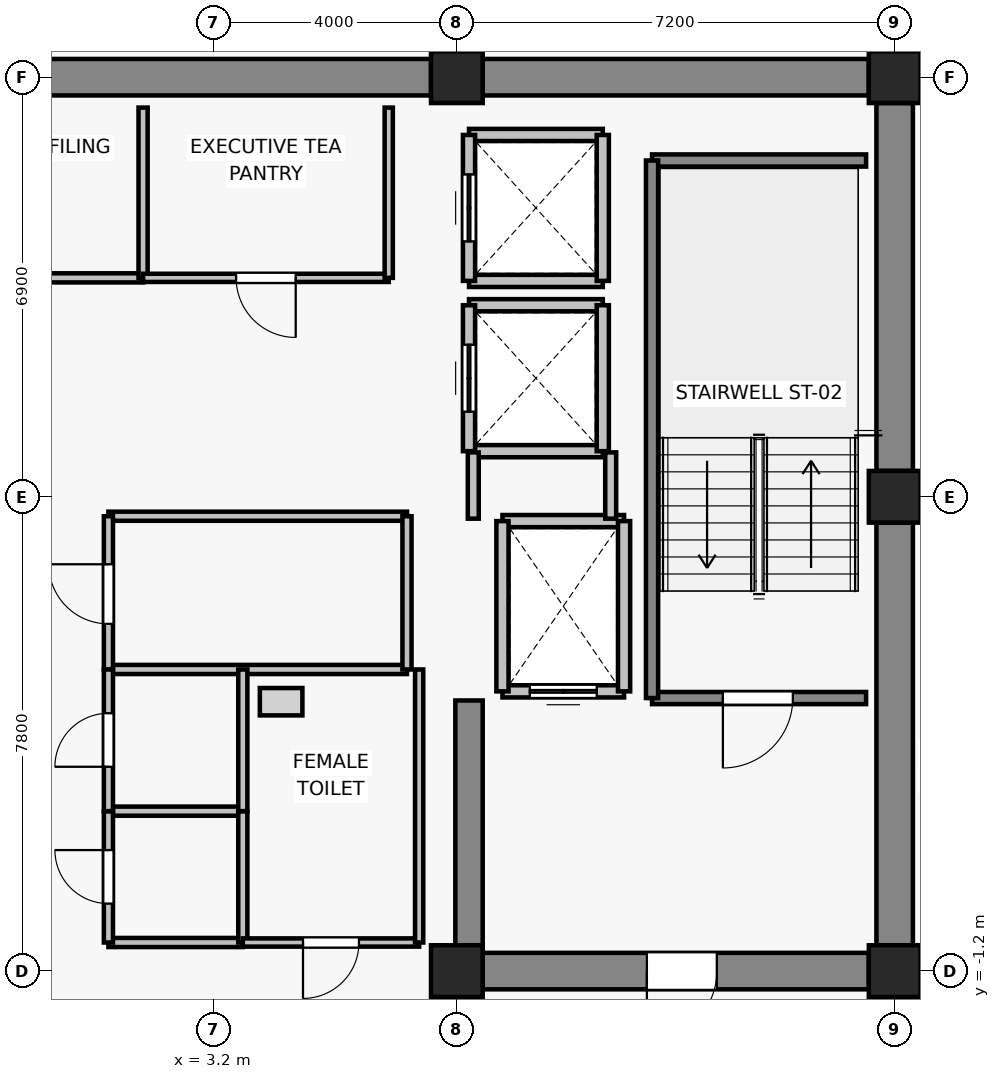
"""IFC4 building model, lengths in metres.
Left out: names, types, materials, properties, quantities, classifications, styles, units other than length and angle.
Written with IfcOpenShell. Run it as: python <this file> out.ifc"""

import sys

from ifc_helpers import new_model, si_unit, direction, frame, frame_2d, origin, origin_2d, place, context, subcontext, project, spatial, rectangle, extrude, source, transform, mapped, element, fill, save


model = new_model("IFC4")
c1 = context("Model", 3, precision=1e-05, world=origin(), true_north=direction((0.0, 1.0)))
c2 = subcontext(c1, "Body", "Model", "MODEL_VIEW")
j1 = project(units=[si_unit("LENGTHUNIT", "METRE"), si_unit("PLANEANGLEUNIT", "RADIAN")], contexts=[c1])
p1 = place(None, origin())
s1 = spatial("IfcSite", under=j1, at=p1, CompositionType="ELEMENT")
p2 = place(p1, origin())
s2 = spatial("IfcBuilding", under=s1, at=p2, CompositionType="ELEMENT")
p3 = place(p2, frame((0.0, 0.0, 241.9)))
s3 = spatial("IfcBuildingStorey", under=s2, at=p3, CompositionType="ELEMENT", Elevation=241.9)
for number, where, z_axis, x_axis in (
    (1, (7.2, -1.2, 0.0), (0.0, 0.0, 1.0), (1.0, 0.0, 0.0)),
    (2, (14.4, -1.2, 0.0), (0.0, 0.0, 1.0), (1.0, 0.0, 0.0)),
    (3, (14.4, 6.6, 0.0), (0.0, 0.0, 1.0), (1.0, 0.0, 0.0)),
    (4, (7.2, 13.5, 0.0), (0.0, 0.0, 1.0), (1.0, 0.0, 0.0)),
    (5, (14.4, 13.5, 0.0), (0.0, 0.0, 1.0), (1.0, 0.0, 0.0)),
):
    element("IfcColumn", number, at=place(p3, frame(where, z_axis=z_axis, x_axis=x_axis)), inside=s3, PredefinedType="COLUMN", context=c2, shape_type="SweptSolid", body=[
        extrude(rectangle(XDim=0.85, YDim=0.85, at=origin_2d()), origin(), (0.0, 0.0, 1.0), 3.3),
    ])
p4 = place(p3, frame((-6.775, 13.5, 0.0), z_axis=(0.0, 0.0, 1.0), x_axis=(1.0, 0.0, 0.0)))
e6 = element("IfcWall", 6, at=p4, inside=s3, PredefinedType="SHEAR", context=c2, shape_type="SweptSolid", body=[
    extrude(rectangle(XDim=13.55, YDim=0.6, at=frame_2d((6.775, 0.0))), origin(), (0.0, 0.0, 1.0), 3.075),
])
p5 = place(p3, frame((7.625, 13.5, 0.0), z_axis=(0.0, 0.0, 1.0), x_axis=(1.0, 0.0, 0.0)))
e7 = element("IfcWall", 7, at=p5, inside=s3, PredefinedType="SHEAR", context=c2, shape_type="SweptSolid", body=[
    extrude(rectangle(XDim=6.35, YDim=0.6, at=frame_2d((3.175, 0.0))), origin(), (0.0, 0.0, 1.0), 3.075),
])
p6 = place(p3, frame((14.4, -0.775, 0.0), z_axis=(0.0, 0.0, 1.0), x_axis=(0.0, 1.0, 0.0)))
e8 = element("IfcWall", 8, at=p6, inside=s3, PredefinedType="SHEAR", context=c2, shape_type="SweptSolid", body=[
    extrude(rectangle(XDim=6.95, YDim=0.6, at=frame_2d((3.475, 0.0))), origin(), (0.0, 0.0, 1.0), 3.075),
])
p7 = place(p3, frame((14.4, 7.025, 0.0), z_axis=(0.0, 0.0, 1.0), x_axis=(0.0, 1.0, 0.0)))
e9 = element("IfcWall", 9, at=p7, inside=s3, PredefinedType="SHEAR", context=c2, shape_type="SweptSolid", body=[
    extrude(rectangle(XDim=6.05, YDim=0.6, at=frame_2d((3.025, 0.0))), origin(), (0.0, 0.0, 1.0), 3.075),
])
p8 = place(p3, frame((13.975, -1.2, 0.0), z_axis=(0.0, 0.0, 1.0), x_axis=(-1.0, 0.0, 0.0)))
e10 = element("IfcWall", 10, at=p8, inside=s3, PredefinedType="SHEAR", context=c2, shape_type="SweptSolid", body=[
    extrude(rectangle(XDim=6.35, YDim=0.6, at=frame_2d((3.175, 0.0))), origin(), (0.0, 0.0, 1.0), 3.075),
])
p9 = place(p8, frame((2.5, 0.0, 0.0)))
e11 = element("IfcOpeningElement", 11, at=p9, cuts=e10, PredefinedType="OPENING", context=c2, shape_type="SweptSolid", body=[
    extrude(rectangle(XDim=1.15, YDim=2.15, at=frame_2d((0.575, 1.075))), frame((0.0, 0.31, 0.0), z_axis=(0.0, -1.0, 0.0), x_axis=(1.0, 0.0, 0.0)), (0.0, 0.0, 1.0), 0.62),
])
p10 = place(p3, frame((7.4, -0.9, 0.0), z_axis=(0.0, 0.0, 1.0), x_axis=(0.0, 1.0, 0.0)))
e12 = element("IfcWall", 12, at=p10, inside=s3, PredefinedType="SHEAR", context=c2, shape_type="SweptSolid", body=[
    extrude(rectangle(XDim=4.15, YDim=0.45, at=frame_2d((2.075, 0.0))), origin(), (0.0, 0.0, 1.0), 3.075),
])
p11 = place(p3, frame((9.95, 3.4, 0.0), z_axis=(0.0, 0.0, 1.0), x_axis=(-1.0, 0.0, 0.0)))
e13 = element("IfcWall", 13, at=p11, inside=s3, PredefinedType="SOLIDWALL", context=c2, shape_type="SweptSolid", body=[
    extrude(rectangle(XDim=2.0, YDim=0.2, at=frame_2d((1.0, 0.0))), origin(), (0.0, 0.0, 1.0), 3.075),
])
p12 = place(p11, frame((0.45, 0.0, 0.0)))
e14 = element("IfcOpeningElement", 14, at=p12, cuts=e13, PredefinedType="OPENING", context=c2, shape_type="SweptSolid", body=[
    extrude(rectangle(XDim=1.1, YDim=2.2, at=frame_2d((0.55, 1.1))), frame((0.0, 0.11, 0.0), z_axis=(0.0, -1.0, 0.0), x_axis=(1.0, 0.0, 0.0)), (0.0, 0.0, 1.0), 0.22),
])
p13 = place(p3, frame((7.95, 6.2, 0.0), z_axis=(0.0, 0.0, 1.0), x_axis=(1.0, 0.0, 0.0)))
e15 = element("IfcWall", 15, at=p13, inside=s3, PredefinedType="SOLIDWALL", context=c2, shape_type="SweptSolid", body=[
    extrude(rectangle(XDim=2.0, YDim=0.2, at=frame_2d((1.0, 0.0))), origin(), (0.0, 0.0, 1.0), 3.075),
])
for number, where, z_axis, x_axis in (
    (16, (7.95, 3.4, 0.0), (0.0, 0.0, 1.0), (0.0, 1.0, 0.0)),
    (17, (9.95, 6.2, 0.0), (0.0, 0.0, 1.0), (0.0, -1.0, 0.0)),
):
    element("IfcWall", number, at=place(p3, frame(where, z_axis=z_axis, x_axis=x_axis)), inside=s3, PredefinedType="SOLIDWALL", context=c2, shape_type="SweptSolid", body=[
        extrude(rectangle(XDim=2.8, YDim=0.2, at=frame_2d((1.4, 0.0))), origin(), (0.0, 0.0, 1.0), 3.075),
    ])
for number, where, z_axis, x_axis in (
    (18, (9.6, 7.35, 0.0), (0.0, 0.0, 1.0), (-1.0, 0.0, 0.0)),
    (19, (7.4, 9.75, 0.0), (0.0, 0.0, 1.0), (1.0, 0.0, 0.0)),
):
    element("IfcWall", number, at=place(p3, frame(where, z_axis=z_axis, x_axis=x_axis)), inside=s3, PredefinedType="SOLIDWALL", context=c2, shape_type="SweptSolid", body=[
        extrude(rectangle(XDim=2.2, YDim=0.2, at=frame_2d((1.1, 0.0))), origin(), (0.0, 0.0, 1.0), 2.615),
    ])
p14 = place(p3, frame((7.4, 7.35, 0.0), z_axis=(0.0, 0.0, 1.0), x_axis=(0.0, 1.0, 0.0)))
e20 = element("IfcWall", 20, at=p14, inside=s3, PredefinedType="SOLIDWALL", context=c2, shape_type="SweptSolid", body=[
    extrude(rectangle(XDim=2.4, YDim=0.2, at=frame_2d((1.2, 0.0))), origin(), (0.0, 0.0, 1.0), 2.615),
])
p15 = place(p14, frame((0.65, 0.0, 0.0)))
e21 = element("IfcOpeningElement", 21, at=p15, cuts=e20, PredefinedType="OPENING", context=c2, shape_type="SweptSolid", body=[
    extrude(rectangle(XDim=1.1, YDim=2.2, at=frame_2d((0.55, 1.1))), frame((0.0, 0.11, 0.0), z_axis=(0.0, -1.0, 0.0), x_axis=(1.0, 0.0, 0.0)), (0.0, 0.0, 1.0), 0.22),
])
p16 = place(p3, frame((9.6, 9.75, 0.0), z_axis=(0.0, 0.0, 1.0), x_axis=(0.0, -1.0, 0.0)))
e22 = element("IfcWall", 22, at=p16, inside=s3, PredefinedType="SOLIDWALL", context=c2, shape_type="SweptSolid", body=[
    extrude(rectangle(XDim=2.4, YDim=0.2, at=frame_2d((1.2, 0.0))), origin(), (0.0, 0.0, 1.0), 3.075),
])
for number, where, z_axis, x_axis in (
    (23, (9.6, 10.15, 0.0), (0.0, 0.0, 1.0), (-1.0, 0.0, 0.0)),
    (24, (7.4, 12.55, 0.0), (0.0, 0.0, 1.0), (1.0, 0.0, 0.0)),
):
    element("IfcWall", number, at=place(p3, frame(where, z_axis=z_axis, x_axis=x_axis)), inside=s3, PredefinedType="SOLIDWALL", context=c2, shape_type="SweptSolid", body=[
        extrude(rectangle(XDim=2.2, YDim=0.2, at=frame_2d((1.1, 0.0))), origin(), (0.0, 0.0, 1.0), 2.615),
    ])
p17 = place(p3, frame((7.4, 10.15, 0.0), z_axis=(0.0, 0.0, 1.0), x_axis=(0.0, 1.0, 0.0)))
e25 = element("IfcWall", 25, at=p17, inside=s3, PredefinedType="SOLIDWALL", context=c2, shape_type="SweptSolid", body=[
    extrude(rectangle(XDim=2.4, YDim=0.2, at=frame_2d((1.2, 0.0))), origin(), (0.0, 0.0, 1.0), 2.615),
])
p18 = place(p17, frame((0.65, 0.0, 0.0)))
e26 = element("IfcOpeningElement", 26, at=p18, cuts=e25, PredefinedType="OPENING", context=c2, shape_type="SweptSolid", body=[
    extrude(rectangle(XDim=1.1, YDim=2.2, at=frame_2d((0.55, 1.1))), frame((0.0, 0.11, 0.0), z_axis=(0.0, -1.0, 0.0), x_axis=(1.0, 0.0, 0.0)), (0.0, 0.0, 1.0), 0.22),
])
p19 = place(p3, frame((9.6, 12.55, 0.0), z_axis=(0.0, 0.0, 1.0), x_axis=(0.0, -1.0, 0.0)))
e27 = element("IfcWall", 27, at=p19, inside=s3, PredefinedType="SOLIDWALL", context=c2, shape_type="SweptSolid", body=[
    extrude(rectangle(XDim=2.4, YDim=0.2, at=frame_2d((1.2, 0.0))), origin(), (0.0, 0.0, 1.0), 3.075),
])
p20 = place(p3, frame((13.93, 3.29, 0.0), z_axis=(0.0, 0.0, 1.0), x_axis=(-1.0, 0.0, 0.0)))
e28 = element("IfcWall", 28, at=p20, inside=s3, PredefinedType="SOLIDWALL", context=c2, shape_type="SweptSolid", body=[
    extrude(rectangle(XDim=3.52, YDim=0.2, at=frame_2d((1.76, 0.0))), origin(), (0.0, 0.0, 1.0), 3.075),
])
p21 = place(p20, frame((1.205, 0.0, 0.0)))
e29 = element("IfcOpeningElement", 29, at=p21, cuts=e28, PredefinedType="OPENING", context=c2, shape_type="SweptSolid", body=[
    extrude(rectangle(XDim=1.15, YDim=2.15, at=frame_2d((0.575, 1.075))), frame((0.0, 0.11, 0.0), z_axis=(0.0, -1.0, 0.0), x_axis=(1.0, 0.0, 0.0)), (0.0, 0.0, 1.0), 0.22),
])
p22 = place(p3, frame((10.41, 12.13, 0.0), z_axis=(0.0, 0.0, 1.0), x_axis=(1.0, 0.0, 0.0)))
e30 = element("IfcWall", 30, at=p22, inside=s3, PredefinedType="SOLIDWALL", context=c2, shape_type="SweptSolid", body=[
    extrude(rectangle(XDim=3.52, YDim=0.2, at=frame_2d((1.76, 0.0))), origin(), (0.0, 0.0, 1.0), 3.075),
])
p23 = place(p3, frame((10.41, 3.29, 0.0), z_axis=(0.0, 0.0, 1.0), x_axis=(0.0, 1.0, 0.0)))
e31 = element("IfcWall", 31, at=p23, inside=s3, PredefinedType="SOLIDWALL", context=c2, shape_type="SweptSolid", body=[
    extrude(rectangle(XDim=8.84, YDim=0.2, at=frame_2d((4.42, 0.0))), origin(), (0.0, 0.0, 1.0), 3.075),
])
p24 = place(p3, frame((7.47, 6.24, 0.0), z_axis=(0.0, 0.0, 1.0), x_axis=(0.0, 1.0, 0.0)))
e32 = element("IfcWall", 32, at=p24, inside=s3, PredefinedType="PARTITIONING", context=c2, shape_type="SweptSolid", body=[
    extrude(rectangle(XDim=1.09, YDim=0.18, at=frame_2d((0.545, 0.0))), origin(), (0.0, 0.0, 1.0), 2.615),
])
p25 = place(p3, frame((9.73, 7.33, 0.0), z_axis=(0.0, 0.0, 1.0), x_axis=(0.0, -1.0, 0.0)))
e33 = element("IfcWall", 33, at=p25, inside=s3, PredefinedType="PARTITIONING", context=c2, shape_type="SweptSolid", body=[
    extrude(rectangle(XDim=1.09, YDim=0.18, at=frame_2d((0.545, 0.0))), origin(), (0.0, 0.0, 1.0), 3.075),
])
p26 = place(p3, frame((2.04, 10.2, 0.0), z_axis=(0.0, 0.0, 1.0), x_axis=(-1.0, 0.0, 0.0)))
e34 = element("IfcWall", 34, at=p26, inside=s3, PredefinedType="PARTITIONING", context=c2, shape_type="SweptSolid", body=[
    extrude(rectangle(XDim=4.16, YDim=0.15, at=frame_2d((2.08, 0.0))), origin(), (0.0, 0.0, 1.0), 3.075),
])
p27 = place(p26, frame((1.55, 0.0, 0.0)))
e35 = element("IfcOpeningElement", 35, at=p27, cuts=e34, PredefinedType="OPENING", context=c2, shape_type="SweptSolid", body=[
    extrude(rectangle(XDim=0.98, YDim=2.15, at=frame_2d((0.49, 1.075))), frame((0.0, 0.085, 0.0), z_axis=(0.0, -1.0, 0.0), x_axis=(1.0, 0.0, 0.0)), (0.0, 0.0, 1.0), 0.17),
])
p28 = place(p3, frame((2.04, 13.0, 0.0), z_axis=(0.0, 0.0, 1.0), x_axis=(0.0, -1.0, 0.0)))
e36 = element("IfcWall", 36, at=p28, inside=s3, PredefinedType="PARTITIONING", context=c2, shape_type="SweptSolid", body=[
    extrude(rectangle(XDim=2.8, YDim=0.15, at=frame_2d((1.4, 0.0))), origin(), (0.0, 0.0, 1.0), 3.075),
])
p29 = place(p3, frame((6.08, 10.2, 0.0), z_axis=(0.0, 0.0, 1.0), x_axis=(-1.0, 0.0, 0.0)))
e37 = element("IfcWall", 37, at=p29, inside=s3, PredefinedType="PARTITIONING", context=c2, shape_type="SweptSolid", body=[
    extrude(rectangle(XDim=4.04, YDim=0.135, at=frame_2d((2.02, 0.0))), origin(), (0.0, 0.0, 1.0), 3.075),
])
p30 = place(p29, frame((1.53, 0.0, 0.0)))
e38 = element("IfcOpeningElement", 38, at=p30, cuts=e37, PredefinedType="OPENING", context=c2, shape_type="SweptSolid", body=[
    extrude(rectangle(XDim=0.98, YDim=2.15, at=frame_2d((0.49, 1.075))), frame((0.0, 0.077, 0.0), z_axis=(0.0, -1.0, 0.0), x_axis=(1.0, 0.0, 0.0)), (0.0, 0.0, 1.0), 0.155),
])
p31 = place(p3, frame((6.08, 13.0, 0.0), z_axis=(0.0, 0.0, 1.0), x_axis=(0.0, -1.0, 0.0)))
e39 = element("IfcWall", 39, at=p31, inside=s3, PredefinedType="PARTITIONING", context=c2, shape_type="SweptSolid", body=[
    extrude(rectangle(XDim=2.8, YDim=0.135, at=frame_2d((1.4, 0.0))), origin(), (0.0, 0.0, 1.0), 3.075),
])
for number, where, z_axis, x_axis in (
    (40, (6.38, 3.76, 0.0), (0.0, 0.0, 1.0), (-1.0, 0.0, 0.0)),
    (41, (1.47, 6.28, 0.0), (0.0, 0.0, 1.0), (1.0, 0.0, 0.0)),
):
    element("IfcWall", number, at=place(p3, frame(where, z_axis=z_axis, x_axis=x_axis)), inside=s3, PredefinedType="PARTITIONING", context=c2, shape_type="SweptSolid", body=[
        extrude(rectangle(XDim=4.91, YDim=0.15, at=frame_2d((2.455, 0.0))), origin(), (0.0, 0.0, 1.0), 3.075),
    ])
p32 = place(p3, frame((1.47, 3.76, 0.0), z_axis=(0.0, 0.0, 1.0), x_axis=(0.0, 1.0, 0.0)))
e42 = element("IfcWall", 42, at=p32, inside=s3, PredefinedType="PARTITIONING", context=c2, shape_type="SweptSolid", body=[
    extrude(rectangle(XDim=2.52, YDim=0.15, at=frame_2d((1.26, 0.0))), origin(), (0.0, 0.0, 1.0), 3.075),
])
p33 = place(p32, frame((0.75, 0.0, 0.0)))
e43 = element("IfcOpeningElement", 43, at=p33, cuts=e42, PredefinedType="OPENING", context=c2, shape_type="SweptSolid", body=[
    extrude(rectangle(XDim=0.98, YDim=2.15, at=frame_2d((0.49, 1.075))), frame((0.0, 0.085, 0.0), z_axis=(0.0, -1.0, 0.0), x_axis=(1.0, 0.0, 0.0)), (0.0, 0.0, 1.0), 0.17),
])
p34 = place(p3, frame((6.38, 6.28, 0.0), z_axis=(0.0, 0.0, 1.0), x_axis=(0.0, -1.0, 0.0)))
e44 = element("IfcWall", 44, at=p34, inside=s3, PredefinedType="PARTITIONING", context=c2, shape_type="SweptSolid", body=[
    extrude(rectangle(XDim=2.52, YDim=0.15, at=frame_2d((1.26, 0.0))), origin(), (0.0, 0.0, 1.0), 3.075),
])
for number, where, z_axis, x_axis in (
    (45, (3.68, -0.73, 0.0), (0.0, 0.0, 1.0), (-1.0, 0.0, 0.0)),
    (46, (1.47, 1.43, 0.0), (0.0, 0.0, 1.0), (1.0, 0.0, 0.0)),
):
    element("IfcWall", number, at=place(p3, frame(where, z_axis=z_axis, x_axis=x_axis)), inside=s3, PredefinedType="PARTITIONING", context=c2, shape_type="SweptSolid", body=[
        extrude(rectangle(XDim=2.21, YDim=0.15, at=frame_2d((1.105, 0.0))), origin(), (0.0, 0.0, 1.0), 3.075),
    ])
p35 = place(p3, frame((1.47, -0.73, 0.0), z_axis=(0.0, 0.0, 1.0), x_axis=(0.0, 1.0, 0.0)))
e47 = element("IfcWall", 47, at=p35, inside=s3, PredefinedType="PARTITIONING", context=c2, shape_type="SweptSolid", body=[
    extrude(rectangle(XDim=2.16, YDim=0.15, at=frame_2d((1.08, 0.0))), origin(), (0.0, 0.0, 1.0), 3.075),
])
p36 = place(p35, frame((0.64, 0.0, 0.0)))
e48 = element("IfcOpeningElement", 48, at=p36, cuts=e47, PredefinedType="OPENING", context=c2, shape_type="SweptSolid", body=[
    extrude(rectangle(XDim=0.88, YDim=2.1, at=frame_2d((0.44, 1.05))), frame((0.0, 0.085, 0.0), z_axis=(0.0, -1.0, 0.0), x_axis=(1.0, 0.0, 0.0)), (0.0, 0.0, 1.0), 0.17),
])
p37 = place(p3, frame((3.68, 1.43, 0.0), z_axis=(0.0, 0.0, 1.0), x_axis=(0.0, -1.0, 0.0)))
e49 = element("IfcWall", 49, at=p37, inside=s3, PredefinedType="PARTITIONING", context=c2, shape_type="SweptSolid", body=[
    extrude(rectangle(XDim=2.16, YDim=0.15, at=frame_2d((1.08, 0.0))), origin(), (0.0, 0.0, 1.0), 3.075),
])
p38 = place(p3, frame((1.47, 1.43, 0.0), z_axis=(0.0, 0.0, 1.0), x_axis=(0.0, 1.0, 0.0)))
e50 = element("IfcWall", 50, at=p38, inside=s3, PredefinedType="PARTITIONING", context=c2, shape_type="SweptSolid", body=[
    extrude(rectangle(XDim=2.33, YDim=0.15, at=frame_2d((1.165, 0.0))), origin(), (0.0, 0.0, 1.0), 3.075),
])
p39 = place(p38, frame((0.73, 0.0, 0.0)))
e51 = element("IfcOpeningElement", 51, at=p39, cuts=e50, PredefinedType="OPENING", context=c2, shape_type="SweptSolid", body=[
    extrude(rectangle(XDim=0.88, YDim=2.15, at=frame_2d((0.44, 1.075))), frame((0.0, 0.085, 0.0), z_axis=(0.0, -1.0, 0.0), x_axis=(1.0, 0.0, 0.0)), (0.0, 0.0, 1.0), 0.17),
])
p40 = place(p3, frame((3.68, 3.76, 0.0), z_axis=(0.0, 0.0, 1.0), x_axis=(0.0, -1.0, 0.0)))
e52 = element("IfcWall", 52, at=p40, inside=s3, PredefinedType="PARTITIONING", context=c2, shape_type="SweptSolid", body=[
    extrude(rectangle(XDim=2.33, YDim=0.15, at=frame_2d((1.165, 0.0))), origin(), (0.0, 0.0, 1.0), 3.075),
])
p41 = place(p3, frame((6.58, -0.73, 0.0), z_axis=(0.0, 0.0, 1.0), x_axis=(-1.0, 0.0, 0.0)))
e53 = element("IfcWall", 53, at=p41, inside=s3, PredefinedType="PARTITIONING", context=c2, shape_type="SweptSolid", body=[
    extrude(rectangle(XDim=2.9, YDim=0.135, at=frame_2d((1.45, 0.0))), origin(), (0.0, 0.0, 1.0), 3.075),
])
p42 = place(p41, frame((0.99, 0.0, 0.0)))
e54 = element("IfcOpeningElement", 54, at=p42, cuts=e53, PredefinedType="OPENING", context=c2, shape_type="SweptSolid", body=[
    extrude(rectangle(XDim=0.92, YDim=2.1, at=frame_2d((0.46, 1.05))), frame((0.0, 0.077, 0.0), z_axis=(0.0, -1.0, 0.0), x_axis=(1.0, 0.0, 0.0)), (0.0, 0.0, 1.0), 0.155),
])
p43 = place(p3, frame((6.58, 3.76, 0.0), z_axis=(0.0, 0.0, 1.0), x_axis=(0.0, -1.0, 0.0)))
e55 = element("IfcWall", 55, at=p43, inside=s3, PredefinedType="PARTITIONING", context=c2, shape_type="SweptSolid", body=[
    extrude(rectangle(XDim=4.49, YDim=0.135, at=frame_2d((2.245, 0.0))), origin(), (0.0, 0.0, 1.0), 3.075),
])
m1 = source(origin(), c2, "Body", "SweptSolid", [
    extrude(rectangle(XDim=1.1, YDim=2.2, at=frame_2d((0.55, 1.1))), frame((0.0, 0.025, 0.0), z_axis=(0.0, -1.0, 0.0), x_axis=(1.0, 0.0, 0.0)), (0.0, 0.0, 1.0), 0.05),
])
p44 = place(p12, origin())
e56 = element("IfcDoor", 56, at=p44, inside=s3, OperationType="DOUBLE_DOOR_SLIDING", PredefinedType="DOOR", context=c2, shape_type="MappedRepresentation", body=[
    mapped(m1, transform((0.0, 0.0, 0.0), x_axis=(1.0, 0.0, 0.0), y_axis=(0.0, 1.0, 0.0), z_axis=(0.0, 0.0, 1.0), scale=1.0)),
])
fill(e14, e56)
p45 = place(p15, origin())
e57 = element("IfcDoor", 57, at=p45, inside=s3, OperationType="DOUBLE_DOOR_SLIDING", PredefinedType="DOOR", context=c2, shape_type="MappedRepresentation", body=[
    mapped(m1, transform((0.0, 0.0, 0.0), x_axis=(1.0, 0.0, 0.0), y_axis=(0.0, 1.0, 0.0), z_axis=(0.0, 0.0, 1.0), scale=1.0)),
])
fill(e21, e57)
p46 = place(p18, origin())
e58 = element("IfcDoor", 58, at=p46, inside=s3, OperationType="DOUBLE_DOOR_SLIDING", PredefinedType="DOOR", context=c2, shape_type="MappedRepresentation", body=[
    mapped(m1, transform((0.0, 0.0, 0.0), x_axis=(1.0, 0.0, 0.0), y_axis=(0.0, 1.0, 0.0), z_axis=(0.0, 0.0, 1.0), scale=1.0)),
])
fill(e26, e58)
m2 = source(origin(), c2, "Body", "SweptSolid", [
    extrude(rectangle(XDim=1.15, YDim=2.15, at=frame_2d((0.575, 1.075))), frame((0.0, 0.025, 0.0), z_axis=(0.0, -1.0, 0.0), x_axis=(1.0, 0.0, 0.0)), (0.0, 0.0, 1.0), 0.05),
])
p47 = place(p21, origin())
e59 = element("IfcDoor", 59, at=p47, inside=s3, OperationType="SINGLE_SWING_RIGHT", PredefinedType="DOOR", context=c2, shape_type="MappedRepresentation", body=[
    mapped(m2, transform((0.0, 0.0, 0.0), x_axis=(1.0, 0.0, 0.0), y_axis=(0.0, 1.0, 0.0), z_axis=(0.0, 0.0, 1.0), scale=1.0)),
])
fill(e29, e59)
p48 = place(p9, origin())
e60 = element("IfcDoor", 60, at=p48, inside=s3, OperationType="SINGLE_SWING_RIGHT", PredefinedType="DOOR", context=c2, shape_type="MappedRepresentation", body=[
    mapped(m2, transform((0.0, 0.0, 0.0), x_axis=(1.0, 0.0, 0.0), y_axis=(0.0, 1.0, 0.0), z_axis=(0.0, 0.0, 1.0), scale=1.0)),
])
fill(e11, e60)
m3 = source(origin(), c2, "Body", "SweptSolid", [
    extrude(rectangle(XDim=0.98, YDim=2.15, at=frame_2d((0.49, 1.075))), frame((0.0, 0.025, 0.0), z_axis=(0.0, -1.0, 0.0), x_axis=(1.0, 0.0, 0.0)), (0.0, 0.0, 1.0), 0.05),
])
p49 = place(p30, origin())
e61 = element("IfcDoor", 61, at=p49, inside=s3, OperationType="SINGLE_SWING_LEFT", PredefinedType="DOOR", context=c2, shape_type="MappedRepresentation", body=[
    mapped(m3, transform((0.0, 0.0, 0.0), x_axis=(1.0, 0.0, 0.0), y_axis=(0.0, 1.0, 0.0), z_axis=(0.0, 0.0, 1.0), scale=1.0)),
])
fill(e38, e61)
p50 = place(p33, origin())
e62 = element("IfcDoor", 62, at=p50, inside=s3, OperationType="SINGLE_SWING_RIGHT", PredefinedType="DOOR", context=c2, shape_type="MappedRepresentation", body=[
    mapped(m3, transform((0.0, 0.0, 0.0), x_axis=(1.0, 0.0, 0.0), y_axis=(0.0, 1.0, 0.0), z_axis=(0.0, 0.0, 1.0), scale=1.0)),
])
fill(e43, e62)
m4 = source(origin(), c2, "Body", "SweptSolid", [
    extrude(rectangle(XDim=0.88, YDim=2.1, at=frame_2d((0.44, 1.05))), frame((0.0, 0.025, 0.0), z_axis=(0.0, -1.0, 0.0), x_axis=(1.0, 0.0, 0.0)), (0.0, 0.0, 1.0), 0.05),
])
p51 = place(p36, origin())
e63 = element("IfcDoor", 63, at=p51, inside=s3, OperationType="SINGLE_SWING_RIGHT", PredefinedType="DOOR", context=c2, shape_type="MappedRepresentation", body=[
    mapped(m4, transform((0.0, 0.0, 0.0), x_axis=(1.0, 0.0, 0.0), y_axis=(0.0, 1.0, 0.0), z_axis=(0.0, 0.0, 1.0), scale=1.0)),
])
fill(e48, e63)
m5 = source(origin(), c2, "Body", "SweptSolid", [
    extrude(rectangle(XDim=0.88, YDim=2.15, at=frame_2d((0.44, 1.075))), frame((0.0, 0.025, 0.0), z_axis=(0.0, -1.0, 0.0), x_axis=(1.0, 0.0, 0.0)), (0.0, 0.0, 1.0), 0.05),
])
p52 = place(p39, origin())
e64 = element("IfcDoor", 64, at=p52, inside=s3, OperationType="SINGLE_SWING_LEFT", PredefinedType="DOOR", context=c2, shape_type="MappedRepresentation", body=[
    mapped(m5, transform((0.0, 0.0, 0.0), x_axis=(1.0, 0.0, 0.0), y_axis=(0.0, 1.0, 0.0), z_axis=(0.0, 0.0, 1.0), scale=1.0)),
])
fill(e51, e64)
m6 = source(origin(), c2, "Body", "SweptSolid", [
    extrude(rectangle(XDim=0.92, YDim=2.1, at=frame_2d((0.46, 1.05))), frame((0.0, 0.025, 0.0), z_axis=(0.0, -1.0, 0.0), x_axis=(1.0, 0.0, 0.0)), (0.0, 0.0, 1.0), 0.05),
])
p53 = place(p42, origin())
e65 = element("IfcDoor", 65, at=p53, inside=s3, OperationType="SINGLE_SWING_RIGHT", PredefinedType="DOOR", context=c2, shape_type="MappedRepresentation", body=[
    mapped(m6, transform((0.0, 0.0, 0.0), x_axis=(1.0, 0.0, 0.0), y_axis=(0.0, 1.0, 0.0), z_axis=(0.0, 0.0, 1.0), scale=1.0)),
])
fill(e54, e65)
save(model, sys.argv[1])
